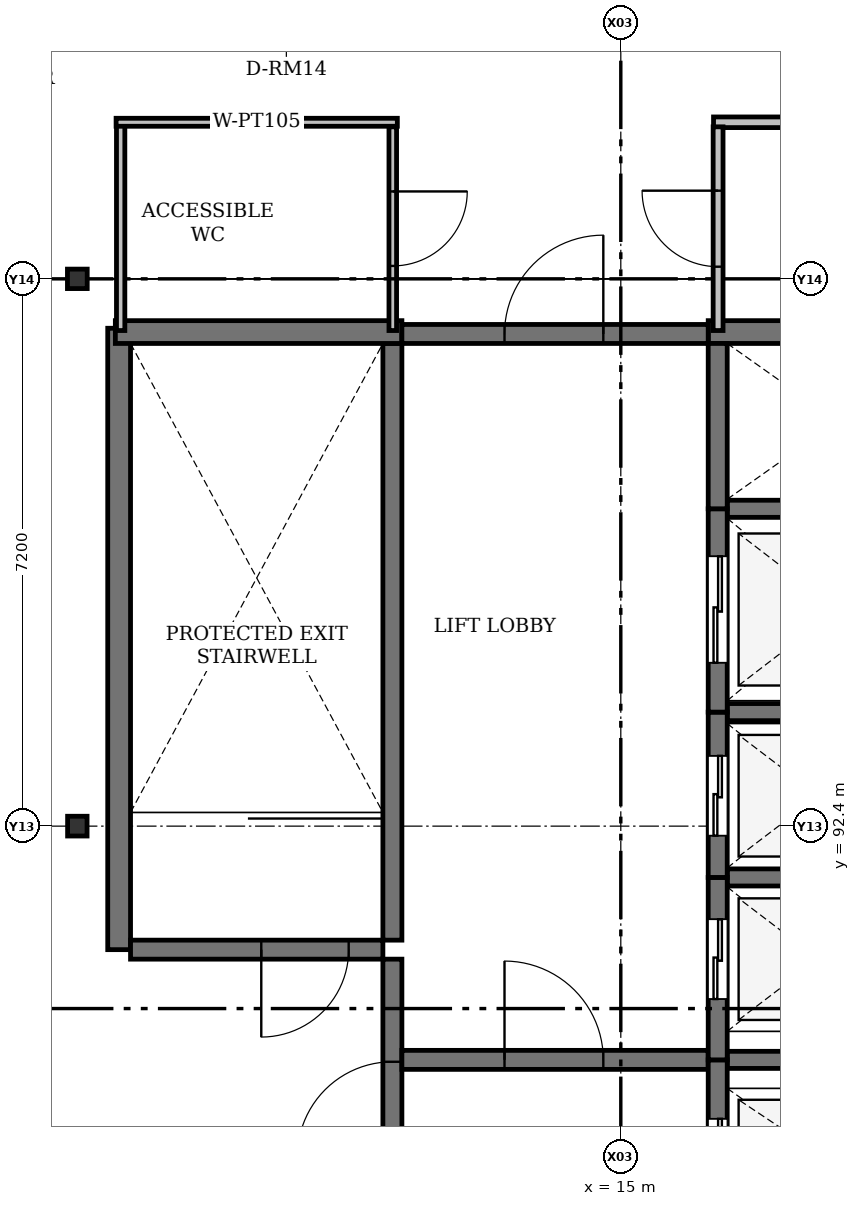
"""IFC4 building model, lengths in metres.
Left out: names, types, materials, properties, quantities, classifications, styles, units other than length and angle.
Written with IfcOpenShell. Run it as: python <this file> out.ifc"""

import sys

from ifc_helpers import new_model, si_unit, direction, frame, frame_2d, origin, origin_2d, place, context, subcontext, project, spatial, rectangle, i_section, extrude, element, fill, save


model = new_model("IFC4")
c1 = context("Model", 3, precision=1e-05, world=origin(), true_north=direction((0.0, 1.0)))
c2 = subcontext(c1, "Body", "Model", "MODEL_VIEW")
j1 = project(units=[si_unit("LENGTHUNIT", "METRE"), si_unit("PLANEANGLEUNIT", "RADIAN")], contexts=[c1])
p1 = place(None, origin())
s1 = spatial("IfcSite", under=j1, at=p1, CompositionType="ELEMENT")
p2 = place(p1, origin())
s2 = spatial("IfcBuilding", under=s1, at=p2, CompositionType="ELEMENT")
p3 = place(p2, frame((0.0, 0.0, 64.5)))
s3 = spatial("IfcBuildingStorey", under=s2, at=p3, CompositionType="ELEMENT", Elevation=64.5)
for number, where, z_axis, x_axis in (
    (1, (7.85, 92.4, 0.0), (0.0, 0.0, 1.0), (1.0, 0.0, 0.0)),
    (2, (7.85, 99.6, 0.0), (0.0, 0.0, 1.0), (0.0, 1.0, 0.0)),
):
    element("IfcColumn", number, at=place(p3, frame(where, z_axis=z_axis, x_axis=x_axis)), inside=s3, PredefinedType="COLUMN", context=c2, shape_type="SweptSolid", body=[
        extrude(i_section(OverallWidth=0.256, OverallDepth=0.26, WebThickness=0.011, FlangeThickness=0.017, FilletRadius=0.013, at=origin_2d()), origin(), (0.0, 0.0, 1.0), 4.2),
    ])
p4 = place(p3, frame((8.4, 90.775, 0.0), z_axis=(0.0, 0.0, 1.0), x_axis=(0.0, 1.0, 0.0)))
e3 = element("IfcWall", 3, at=p4, inside=s3, PredefinedType="SHEAR", context=c2, shape_type="SweptSolid", body=[
    extrude(rectangle(XDim=8.175, YDim=0.3, at=frame_2d((4.087, 0.0))), origin(), (0.0, 0.0, 1.0), 4.2),
])
p5 = place(p3, frame((11.995, 90.9, 0.0), z_axis=(0.0, 0.0, 1.0), x_axis=(0.0, 1.0, 0.0)))
e4 = element("IfcWall", 4, at=p5, inside=s3, PredefinedType="SHEAR", context=c2, shape_type="SweptSolid", body=[
    extrude(rectangle(XDim=7.85, YDim=0.25, at=frame_2d((3.925, 0.0))), origin(), (0.0, 0.0, 1.0), 4.2),
])
p6 = place(p3, frame((11.995, 86.75, 0.0), z_axis=(0.0, 0.0, 1.0), x_axis=(0.0, 1.0, 0.0)))
e5 = element("IfcWall", 5, at=p6, inside=s3, PredefinedType="SHEAR", context=c2, shape_type="SweptSolid", body=[
    extrude(rectangle(XDim=3.9, YDim=0.25, at=frame_2d((1.95, 0.0))), origin(), (0.0, 0.0, 1.0), 4.2),
])
p7 = place(p6, frame((1.3, 0.0, 0.0)))
e6 = element("IfcOpeningElement", 6, at=p7, cuts=e5, PredefinedType="OPENING", context=c2, shape_type="SweptSolid", body=[
    extrude(rectangle(XDim=1.25, YDim=2.2, at=frame_2d((0.625, 1.1))), frame((0.0, 0.125, 0.0), z_axis=(0.0, -1.0, 0.0), x_axis=(1.0, 0.0, 0.0)), (0.0, 0.0, 1.0), 0.25),
])
p8 = place(p3, frame((8.35, 98.9, 0.0), z_axis=(0.0, 0.0, 1.0), x_axis=(1.0, 0.0, 0.0)))
e7 = element("IfcWall", 7, at=p8, inside=s3, PredefinedType="SHEAR", context=c2, shape_type="SweptSolid", body=[
    extrude(rectangle(XDim=3.77, YDim=0.3, at=frame_2d((1.885, 0.0))), origin(), (0.0, 0.0, 1.0), 4.2),
])
p9 = place(p3, frame((16.15, 98.9, 0.0), z_axis=(0.0, 0.0, 1.0), x_axis=(1.0, 0.0, 0.0)))
e8 = element("IfcWall", 8, at=p9, inside=s3, PredefinedType="SHEAR", context=c2, shape_type="SweptSolid", body=[
    extrude(rectangle(XDim=3.3, YDim=0.3, at=frame_2d((1.65, 0.0))), origin(), (0.0, 0.0, 1.0), 4.2),
])
p10 = place(p3, frame((12.12, 98.875, 0.0), z_axis=(0.0, 0.0, 1.0), x_axis=(1.0, 0.0, 0.0)))
e9 = element("IfcWall", 9, at=p10, inside=s3, PredefinedType="SHEAR", context=c2, shape_type="SweptSolid", body=[
    extrude(rectangle(XDim=4.03, YDim=0.25, at=frame_2d((2.015, 0.0))), origin(), (0.0, 0.0, 1.0), 4.2),
])
p11 = place(p10, frame((1.35, 0.0, 0.0)))
e10 = element("IfcOpeningElement", 10, at=p11, cuts=e9, PredefinedType="OPENING", context=c2, shape_type="SweptSolid", body=[
    extrude(rectangle(XDim=1.3, YDim=2.2, at=frame_2d((0.65, 1.1))), frame((0.0, 0.125, 0.0), z_axis=(0.0, -1.0, 0.0), x_axis=(1.0, 0.0, 0.0)), (0.0, 0.0, 1.0), 0.25),
])
p12 = place(p3, frame((11.87, 90.775, 0.0), z_axis=(0.0, 0.0, 1.0), x_axis=(-1.0, 0.0, 0.0)))
e11 = element("IfcWall", 11, at=p12, inside=s3, PredefinedType="SHEAR", context=c2, shape_type="SweptSolid", body=[
    extrude(rectangle(XDim=3.32, YDim=0.25, at=frame_2d((1.66, 0.0))), origin(), (0.0, 0.0, 1.0), 4.2),
])
p13 = place(p12, frame((0.45, 0.0, 0.0)))
e12 = element("IfcOpeningElement", 12, at=p13, cuts=e11, PredefinedType="OPENING", context=c2, shape_type="SweptSolid", body=[
    extrude(rectangle(XDim=1.15, YDim=2.15, at=frame_2d((0.575, 1.075))), frame((0.0, 0.125, 0.0), z_axis=(0.0, -1.0, 0.0), x_axis=(1.0, 0.0, 0.0)), (0.0, 0.0, 1.0), 0.25),
])
p14 = place(p3, frame((12.12, 89.325, 0.0), z_axis=(0.0, 0.0, 1.0), x_axis=(1.0, 0.0, 0.0)))
e13 = element("IfcWall", 13, at=p14, inside=s3, PredefinedType="SHEAR", context=c2, shape_type="SweptSolid", body=[
    extrude(rectangle(XDim=4.03, YDim=0.25, at=frame_2d((2.015, 0.0))), origin(), (0.0, 0.0, 1.0), 4.2),
])
p15 = place(p14, frame((1.35, 0.0, 0.0)))
e14 = element("IfcOpeningElement", 14, at=p15, cuts=e13, PredefinedType="OPENING", context=c2, shape_type="SweptSolid", body=[
    extrude(rectangle(XDim=1.3, YDim=2.2, at=frame_2d((0.65, 1.1))), frame((0.0, 0.125, 0.0), z_axis=(0.0, -1.0, 0.0), x_axis=(1.0, 0.0, 0.0)), (0.0, 0.0, 1.0), 0.25),
])
for number, where, z_axis, x_axis in (
    (15, (16.4, 89.325, 0.0), (0.0, 0.0, 1.0), (1.0, 0.0, 0.0)),
    (16, (16.4, 91.725, 0.0), (0.0, 0.0, 1.0), (1.0, 0.0, 0.0)),
    (17, (16.4, 93.9, 0.0), (0.0, 0.0, 1.0), (1.0, 0.0, 0.0)),
    (18, (16.4, 96.575, 0.0), (0.0, 0.0, 1.0), (1.0, 0.0, 0.0)),
):
    element("IfcWall", number, at=place(p3, frame(where, z_axis=z_axis, x_axis=x_axis)), inside=s3, PredefinedType="SHEAR", context=c2, shape_type="SweptSolid", body=[
        extrude(rectangle(XDim=2.8, YDim=0.225, at=frame_2d((1.4, 0.0))), origin(), (0.0, 0.0, 1.0), 4.2),
    ])
p16 = place(p3, frame((16.275, 86.925, 0.0), z_axis=(0.0, 0.0, 1.0), x_axis=(0.0, 1.0, 0.0)))
e19 = element("IfcWall", 19, at=p16, inside=s3, PredefinedType="SHEAR", context=c2, shape_type="SweptSolid", body=[
    extrude(rectangle(XDim=2.4, YDim=0.25, at=frame_2d((1.2, 0.0))), origin(), (0.0, 0.0, 1.0), 4.2),
])
p17 = place(p16, frame((0.525, 0.0, 0.0)))
e20 = element("IfcOpeningElement", 20, at=p17, cuts=e19, PredefinedType="OPENING", context=c2, shape_type="SweptSolid", body=[
    extrude(rectangle(XDim=1.1, YDim=2.15, at=frame_2d((0.55, 1.075))), frame((0.0, 0.125, 0.0), z_axis=(0.0, -1.0, 0.0), x_axis=(1.0, 0.0, 0.0)), (0.0, 0.0, 1.0), 0.25),
])
p18 = place(p3, frame((16.275, 89.325, 0.0), z_axis=(0.0, 0.0, 1.0), x_axis=(0.0, 1.0, 0.0)))
e21 = element("IfcWall", 21, at=p18, inside=s3, PredefinedType="SHEAR", context=c2, shape_type="SweptSolid", body=[
    extrude(rectangle(XDim=2.4, YDim=0.25, at=frame_2d((1.2, 0.0))), origin(), (0.0, 0.0, 1.0), 4.2),
])
p19 = place(p18, frame((0.8, 0.0, 0.0)))
e22 = element("IfcOpeningElement", 22, at=p19, cuts=e21, PredefinedType="OPENING", context=c2, shape_type="SweptSolid", body=[
    extrude(rectangle(XDim=1.05, YDim=2.15, at=frame_2d((0.525, 1.075))), frame((0.0, 0.125, 0.0), z_axis=(0.0, -1.0, 0.0), x_axis=(1.0, 0.0, 0.0)), (0.0, 0.0, 1.0), 0.25),
])
p20 = place(p3, frame((16.275, 91.725, 0.0), z_axis=(0.0, 0.0, 1.0), x_axis=(0.0, 1.0, 0.0)))
e23 = element("IfcWall", 23, at=p20, inside=s3, PredefinedType="SHEAR", context=c2, shape_type="SweptSolid", body=[
    extrude(rectangle(XDim=2.175, YDim=0.25, at=frame_2d((1.087, 0.0))), origin(), (0.0, 0.0, 1.0), 4.2),
])
p21 = place(p20, frame((0.55, 0.0, 0.0)))
e24 = element("IfcOpeningElement", 24, at=p21, cuts=e23, PredefinedType="OPENING", context=c2, shape_type="SweptSolid", body=[
    extrude(rectangle(XDim=1.05, YDim=2.15, at=frame_2d((0.525, 1.075))), frame((0.0, 0.125, 0.0), z_axis=(0.0, -1.0, 0.0), x_axis=(1.0, 0.0, 0.0)), (0.0, 0.0, 1.0), 0.25),
])
p22 = place(p3, frame((16.275, 93.9, 0.0), z_axis=(0.0, 0.0, 1.0), x_axis=(0.0, 1.0, 0.0)))
e25 = element("IfcWall", 25, at=p22, inside=s3, PredefinedType="SHEAR", context=c2, shape_type="SweptSolid", body=[
    extrude(rectangle(XDim=2.675, YDim=0.25, at=frame_2d((1.337, 0.0))), origin(), (0.0, 0.0, 1.0), 4.2),
])
p23 = place(p22, frame((0.65, 0.0, 0.0)))
e26 = element("IfcOpeningElement", 26, at=p23, cuts=e25, PredefinedType="OPENING", context=c2, shape_type="SweptSolid", body=[
    extrude(rectangle(XDim=1.4, YDim=2.25, at=frame_2d((0.7, 1.125))), frame((0.0, 0.125, 0.0), z_axis=(0.0, -1.0, 0.0), x_axis=(1.0, 0.0, 0.0)), (0.0, 0.0, 1.0), 0.25),
])
p24 = place(p3, frame((16.275, 96.575, 0.0), z_axis=(0.0, 0.0, 1.0), x_axis=(0.0, 1.0, 0.0)))
e27 = element("IfcWall", 27, at=p24, inside=s3, PredefinedType="SHEAR", context=c2, shape_type="SweptSolid", body=[
    extrude(rectangle(XDim=2.175, YDim=0.25, at=frame_2d((1.087, 0.0))), origin(), (0.0, 0.0, 1.0), 4.2),
])
p25 = place(p3, frame((8.42, 98.92, 0.0), z_axis=(0.0, 0.0, 1.0), x_axis=(0.0, 1.0, 0.0)))
e28 = element("IfcWall", 28, at=p25, inside=s3, PredefinedType="PARTITIONING", context=c2, shape_type="SweptSolid", body=[
    extrude(rectangle(XDim=2.74, YDim=0.11, at=frame_2d((1.37, 0.0))), origin(), (0.0, 0.0, 1.0), 3.436),
])
p26 = place(p3, frame((8.36, 101.66, 0.0), z_axis=(0.0, 0.0, 1.0), x_axis=(1.0, 0.0, 0.0)))
e29 = element("IfcWall", 29, at=p26, inside=s3, PredefinedType="PARTITIONING", context=c2, shape_type="SweptSolid", body=[
    extrude(rectangle(XDim=3.7, YDim=0.105, at=frame_2d((1.85, 0.0))), origin(), (0.0, 0.0, 1.0), 3.95),
])
p27 = place(p3, frame((12.0, 101.6, 0.0), z_axis=(0.0, 0.0, 1.0), x_axis=(0.0, -1.0, 0.0)))
e30 = element("IfcWall", 30, at=p27, inside=s3, PredefinedType="PARTITIONING", context=c2, shape_type="SweptSolid", body=[
    extrude(rectangle(XDim=2.68, YDim=0.1, at=frame_2d((1.34, 0.0))), origin(), (0.0, 0.0, 1.0), 3.436),
])
p28 = place(p27, frame((0.85, 0.0, 0.0)))
e31 = element("IfcOpeningElement", 31, at=p28, cuts=e30, PredefinedType="OPENING", context=c2, shape_type="SweptSolid", body=[
    extrude(rectangle(XDim=0.98, YDim=2.1, at=frame_2d((0.49, 1.05))), frame((0.0, 0.05, 0.0), z_axis=(0.0, -1.0, 0.0), x_axis=(1.0, 0.0, 0.0)), (0.0, 0.0, 1.0), 0.1),
])
p29 = place(p3, frame((19.38, 101.66, 0.0), z_axis=(0.0, 0.0, 1.0), x_axis=(-1.0, 0.0, 0.0)))
e32 = element("IfcWall", 32, at=p29, inside=s3, PredefinedType="PARTITIONING", context=c2, shape_type="SweptSolid", body=[
    extrude(rectangle(XDim=3.16, YDim=0.14, at=frame_2d((1.58, 0.0))), origin(), (0.0, 0.0, 1.0), 3.95),
])
p30 = place(p3, frame((16.28, 98.92, 0.0), z_axis=(0.0, 0.0, 1.0), x_axis=(0.0, 1.0, 0.0)))
e33 = element("IfcWall", 33, at=p30, inside=s3, PredefinedType="PARTITIONING", context=c2, shape_type="SweptSolid", body=[
    extrude(rectangle(XDim=2.68, YDim=0.13, at=frame_2d((1.34, 0.0))), origin(), (0.0, 0.0, 1.0), 3.436),
])
p31 = place(p30, frame((0.84, 0.0, 0.0)))
e34 = element("IfcOpeningElement", 34, at=p31, cuts=e33, PredefinedType="OPENING", context=c2, shape_type="SweptSolid", body=[
    extrude(rectangle(XDim=1.0, YDim=2.1, at=frame_2d((0.5, 1.05))), frame((0.0, 0.065, 0.0), z_axis=(0.0, -1.0, 0.0), x_axis=(1.0, 0.0, 0.0)), (0.0, 0.0, 1.0), 0.13),
])
p32 = place(p7, origin())
e35 = element("IfcDoor", 35, at=p32, inside=s3, OperationType="SINGLE_SWING_LEFT", PredefinedType="DOOR", context=c2, shape_type="SweptSolid", body=[
    extrude(rectangle(XDim=1.25, YDim=2.2, at=frame_2d((0.625, 1.1))), frame((0.0, 0.025, 0.0), z_axis=(0.0, -1.0, 0.0), x_axis=(1.0, 0.0, 0.0)), (0.0, 0.0, 1.0), 0.05),
])
fill(e6, e35)
p33 = place(p11, origin())
e36 = element("IfcDoor", 36, at=p33, inside=s3, OperationType="SINGLE_SWING_RIGHT", PredefinedType="DOOR", context=c2, shape_type="SweptSolid", body=[
    extrude(rectangle(XDim=1.3, YDim=2.2, at=frame_2d((0.65, 1.1))), frame((0.0, 0.025, 0.0), z_axis=(0.0, -1.0, 0.0), x_axis=(1.0, 0.0, 0.0)), (0.0, 0.0, 1.0), 0.05),
])
fill(e10, e36)
p34 = place(p13, origin())
e37 = element("IfcDoor", 37, at=p34, inside=s3, OperationType="SINGLE_SWING_RIGHT", PredefinedType="DOOR", context=c2, shape_type="SweptSolid", body=[
    extrude(rectangle(XDim=1.15, YDim=2.15, at=frame_2d((0.575, 1.075))), frame((0.0, 0.025, 0.0), z_axis=(0.0, -1.0, 0.0), x_axis=(1.0, 0.0, 0.0)), (0.0, 0.0, 1.0), 0.05),
])
fill(e12, e37)
p35 = place(p15, origin())
e38 = element("IfcDoor", 38, at=p35, inside=s3, OperationType="SINGLE_SWING_LEFT", PredefinedType="DOOR", context=c2, shape_type="SweptSolid", body=[
    extrude(rectangle(XDim=1.3, YDim=2.2, at=frame_2d((0.65, 1.1))), frame((0.0, 0.025, 0.0), z_axis=(0.0, -1.0, 0.0), x_axis=(1.0, 0.0, 0.0)), (0.0, 0.0, 1.0), 0.05),
])
fill(e14, e38)
p36 = place(p17, origin())
e39 = element("IfcDoor", 39, at=p36, inside=s3, OperationType="SLIDING_TO_LEFT", PredefinedType="DOOR", context=c2, shape_type="SweptSolid", body=[
    extrude(rectangle(XDim=1.1, YDim=2.15, at=frame_2d((0.55, 1.075))), frame((0.0, 0.025, 0.0), z_axis=(0.0, -1.0, 0.0), x_axis=(1.0, 0.0, 0.0)), (0.0, 0.0, 1.0), 0.05),
])
fill(e20, e39)
p37 = place(p19, origin())
e40 = element("IfcDoor", 40, at=p37, inside=s3, OperationType="SLIDING_TO_LEFT", PredefinedType="DOOR", context=c2, shape_type="SweptSolid", body=[
    extrude(rectangle(XDim=1.05, YDim=2.15, at=frame_2d((0.525, 1.075))), frame((0.0, 0.025, 0.0), z_axis=(0.0, -1.0, 0.0), x_axis=(1.0, 0.0, 0.0)), (0.0, 0.0, 1.0), 0.05),
])
fill(e22, e40)
p38 = place(p21, origin())
e41 = element("IfcDoor", 41, at=p38, inside=s3, OperationType="SLIDING_TO_LEFT", PredefinedType="DOOR", context=c2, shape_type="SweptSolid", body=[
    extrude(rectangle(XDim=1.05, YDim=2.15, at=frame_2d((0.525, 1.075))), frame((0.0, 0.025, 0.0), z_axis=(0.0, -1.0, 0.0), x_axis=(1.0, 0.0, 0.0)), (0.0, 0.0, 1.0), 0.05),
])
fill(e24, e41)
p39 = place(p23, origin())
e42 = element("IfcDoor", 42, at=p39, inside=s3, OperationType="SLIDING_TO_LEFT", PredefinedType="DOOR", context=c2, shape_type="SweptSolid", body=[
    extrude(rectangle(XDim=1.4, YDim=2.25, at=frame_2d((0.7, 1.125))), frame((0.0, 0.025, 0.0), z_axis=(0.0, -1.0, 0.0), x_axis=(1.0, 0.0, 0.0)), (0.0, 0.0, 1.0), 0.05),
])
fill(e26, e42)
p40 = place(p28, origin())
e43 = element("IfcDoor", 43, at=p40, inside=s3, OperationType="SINGLE_SWING_LEFT", PredefinedType="DOOR", context=c2, shape_type="SweptSolid", body=[
    extrude(rectangle(XDim=0.98, YDim=2.1, at=frame_2d((0.49, 1.05))), frame((0.0, 0.025, 0.0), z_axis=(0.0, -1.0, 0.0), x_axis=(1.0, 0.0, 0.0)), (0.0, 0.0, 1.0), 0.05),
])
fill(e31, e43)
p41 = place(p31, origin())
e44 = element("IfcDoor", 44, at=p41, inside=s3, OperationType="SINGLE_SWING_RIGHT", PredefinedType="DOOR", context=c2, shape_type="SweptSolid", body=[
    extrude(rectangle(XDim=1.0, YDim=2.1, at=frame_2d((0.5, 1.05))), frame((0.0, 0.025, 0.0), z_axis=(0.0, -1.0, 0.0), x_axis=(1.0, 0.0, 0.0)), (0.0, 0.0, 1.0), 0.05),
])
fill(e34, e44)
save(model, sys.argv[1])
